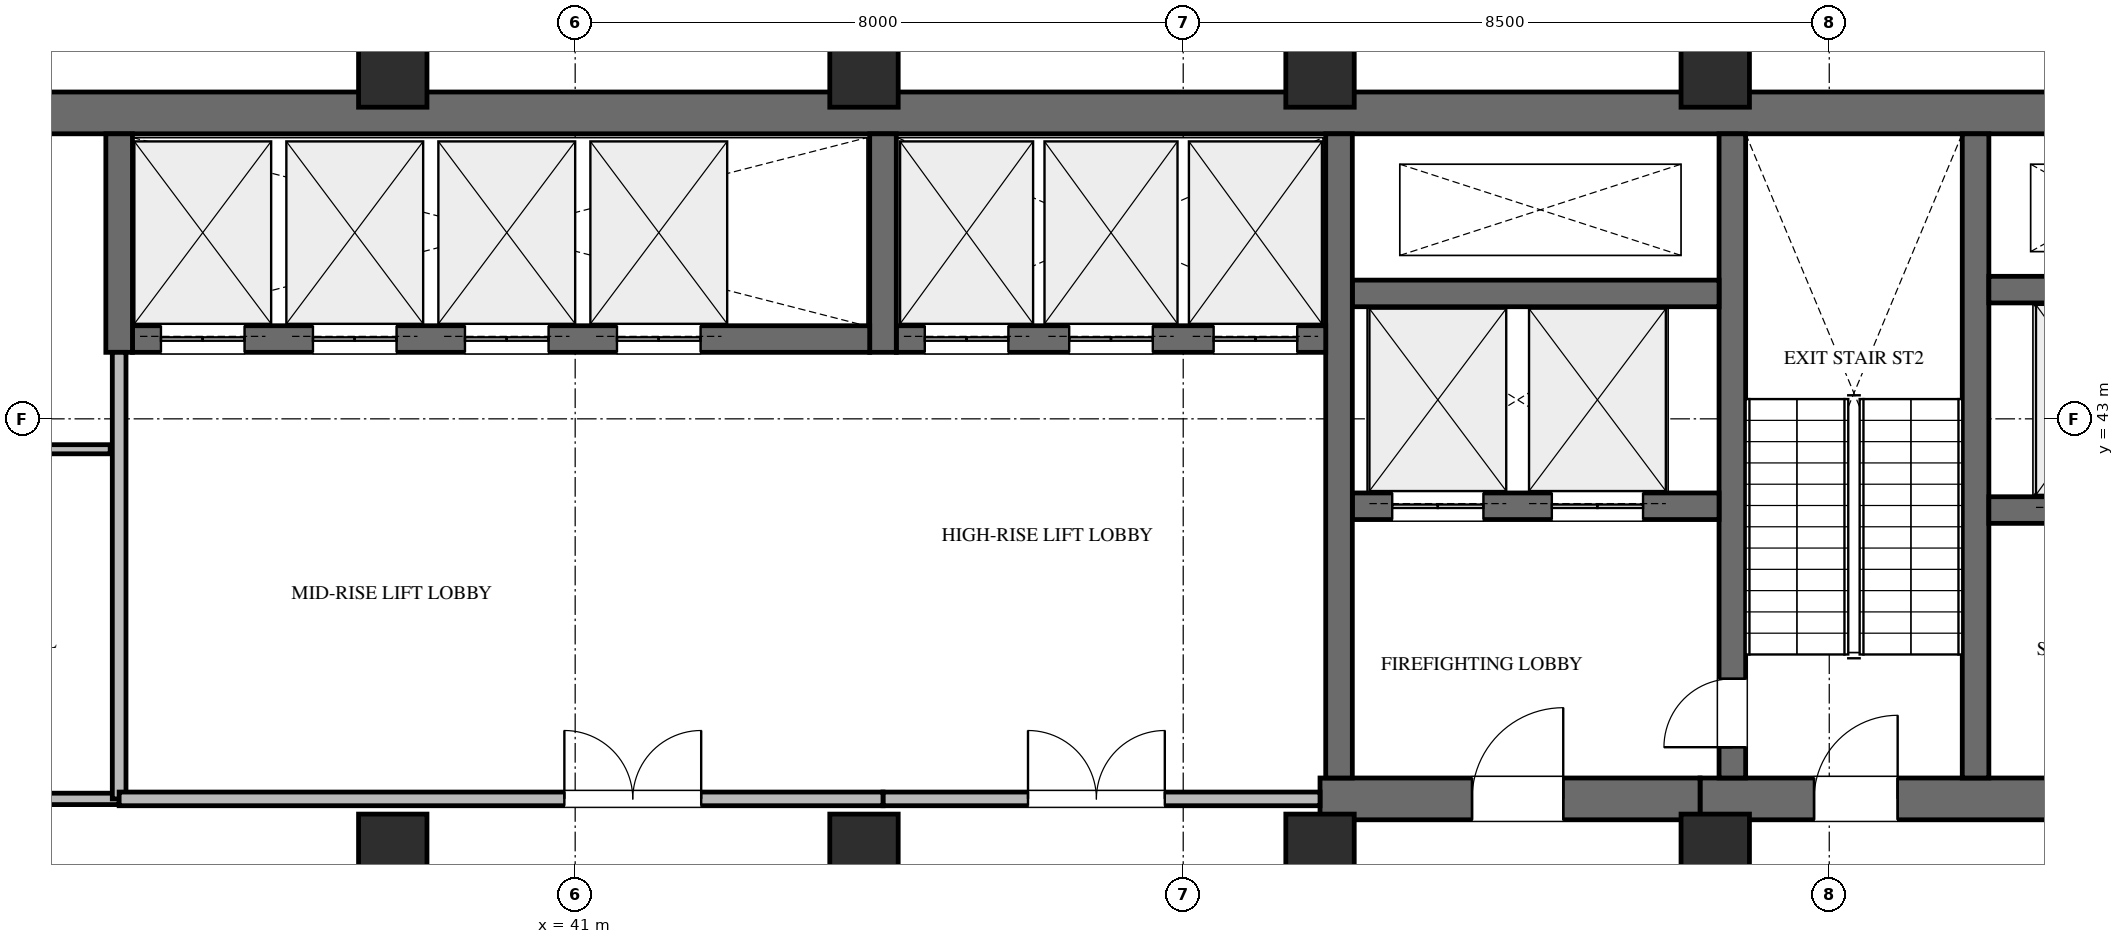
"""IFC4 building model, lengths in metres.
Left out: names, types, materials, properties, quantities, classifications, styles, units other than length and angle.
Written with IfcOpenShell. Run it as: python <this file> out.ifc"""

import sys

from ifc_helpers import new_model, si_unit, direction, frame, frame_2d, origin, origin_2d, place, context, subcontext, project, spatial, rectangle, extrude, element, fill, save


model = new_model("IFC4")
c1 = context("Model", 3, precision=1e-05, world=origin(), true_north=direction((0.0, 1.0)))
c2 = subcontext(c1, "Body", "Model", "MODEL_VIEW")
j1 = project(units=[si_unit("LENGTHUNIT", "METRE"), si_unit("PLANEANGLEUNIT", "RADIAN")], contexts=[c1])
p1 = place(None, origin())
s1 = spatial("IfcSite", under=j1, at=p1, CompositionType="ELEMENT")
p2 = place(p1, origin())
s2 = spatial("IfcBuilding", under=s1, at=p2, CompositionType="ELEMENT")
p3 = place(p2, frame((0.0, 0.0, 220.5)))
s3 = spatial("IfcBuildingStorey", under=s2, at=p3, CompositionType="ELEMENT", Elevation=220.5)
p4 = place(p3, frame((22.9, 47.025, 0.0), z_axis=(0.0, 0.0, 1.0), x_axis=(1.0, 0.0, 0.0)))
e1 = element("IfcWall", 1, at=p4, inside=s3, PredefinedType="SHEAR", context=c2, shape_type="SweptSolid", body=[
    extrude(rectangle(XDim=43.5, YDim=0.55, at=frame_2d((21.75, 0.0))), origin(), (0.0, 0.0, 1.0), 4.5),
])
p5 = place(p3, frame((55.8, 38.0, 0.0), z_axis=(0.0, 0.0, 1.0), x_axis=(1.0, 0.0, 0.0)))
e2 = element("IfcWall", 2, at=p5, inside=s3, PredefinedType="SHEAR", context=c2, shape_type="SweptSolid", body=[
    extrude(rectangle(XDim=10.6, YDim=0.55, at=frame_2d((5.3, 0.0))), origin(), (0.0, 0.0, 1.0), 4.5),
])
p6 = place(p5, frame((1.5, 0.0, 0.0)))
e3 = element("IfcOpeningElement", 3, at=p6, cuts=e2, PredefinedType="OPENING", context=c2, shape_type="SweptSolid", body=[
    extrude(rectangle(XDim=1.1, YDim=2.2, at=frame_2d((0.55, 1.1))), frame((0.0, 0.285, 0.0), z_axis=(0.0, -1.0, 0.0), x_axis=(1.0, 0.0, 0.0)), (0.0, 0.0, 1.0), 0.57),
])
p7 = place(p5, frame((4.82, 0.0, 0.0)))
e4 = element("IfcOpeningElement", 4, at=p7, cuts=e2, PredefinedType="OPENING", context=c2, shape_type="SweptSolid", body=[
    extrude(rectangle(XDim=1.0, YDim=2.15, at=frame_2d((0.5, 1.075))), frame((0.0, 0.285, 0.0), z_axis=(0.0, -1.0, 0.0), x_axis=(1.0, 0.0, 0.0)), (0.0, 0.0, 1.0), 0.57),
])
p8 = place(p5, frame((8.05, 0.0, 0.0)))
e5 = element("IfcOpeningElement", 5, at=p8, cuts=e2, PredefinedType="OPENING", context=c2, shape_type="SweptSolid", body=[
    extrude(rectangle(XDim=1.1, YDim=2.2, at=frame_2d((0.55, 1.1))), frame((0.0, 0.285, 0.0), z_axis=(0.0, -1.0, 0.0), x_axis=(1.0, 0.0, 0.0)), (0.0, 0.0, 1.0), 0.57),
])
p9 = place(p3, frame((59.425, 38.275, 0.0), z_axis=(0.0, 0.0, 1.0), x_axis=(0.0, 1.0, 0.0)))
e6 = element("IfcWall", 6, at=p9, inside=s3, PredefinedType="SHEAR", context=c2, shape_type="SweptSolid", body=[
    extrude(rectangle(XDim=8.475, YDim=0.35, at=frame_2d((4.238, 0.0))), origin(), (0.0, 0.0, 1.0), 4.5),
])
p10 = place(p3, frame((56.225, 38.275, 0.0), z_axis=(0.0, 0.0, 1.0), x_axis=(0.0, 1.0, 0.0)))
e7 = element("IfcWall", 7, at=p10, inside=s3, PredefinedType="SHEAR", context=c2, shape_type="SweptSolid", body=[
    extrude(rectangle(XDim=8.475, YDim=0.35, at=frame_2d((4.238, 0.0))), origin(), (0.0, 0.0, 1.0), 4.5),
])
p11 = place(p10, frame((0.405, 0.0, 0.0)))
e8 = element("IfcOpeningElement", 8, at=p11, cuts=e7, PredefinedType="OPENING", context=c2, shape_type="SweptSolid", body=[
    extrude(rectangle(XDim=0.9, YDim=2.15, at=frame_2d((0.45, 1.075))), frame((0.0, 0.185, 0.0), z_axis=(0.0, -1.0, 0.0), x_axis=(1.0, 0.0, 0.0)), (0.0, 0.0, 1.0), 0.37),
])
p12 = place(p3, frame((59.6, 41.8, 0.0), z_axis=(0.0, 0.0, 1.0), x_axis=(1.0, 0.0, 0.0)))
e9 = element("IfcWall", 9, at=p12, inside=s3, PredefinedType="SHEAR", context=c2, shape_type="SweptSolid", body=[
    extrude(rectangle(XDim=3.05, YDim=0.35, at=frame_2d((1.525, 0.0))), origin(), (0.0, 0.0, 1.0), 4.5),
])
p13 = place(p12, frame((0.92, 0.0, 0.0)))
e10 = element("IfcOpeningElement", 10, at=p13, cuts=e9, PredefinedType="OPENING", context=c2, shape_type="SweptSolid", body=[
    extrude(rectangle(XDim=1.2, YDim=2.2, at=frame_2d((0.6, 1.1))), frame((0.0, 0.185, 0.0), z_axis=(0.0, -1.0, 0.0), x_axis=(1.0, 0.0, 0.0)), (0.0, 0.0, 1.0), 0.37),
])
p14 = place(p3, frame((59.6, 44.7, 0.0), z_axis=(0.0, 0.0, 1.0), x_axis=(1.0, 0.0, 0.0)))
e11 = element("IfcWall", 11, at=p14, inside=s3, PredefinedType="SHEAR", context=c2, shape_type="SweptSolid", body=[
    extrude(rectangle(XDim=3.05, YDim=0.35, at=frame_2d((1.525, 0.0))), origin(), (0.0, 0.0, 1.0), 4.5),
])
p15 = place(p3, frame((50.8, 38.0, 0.0), z_axis=(0.0, 0.0, 1.0), x_axis=(1.0, 0.0, 0.0)))
e12 = element("IfcWall", 12, at=p15, inside=s3, PredefinedType="SHEAR", context=c2, shape_type="SweptSolid", body=[
    extrude(rectangle(XDim=5.0, YDim=0.55, at=frame_2d((2.5, 0.0))), origin(), (0.0, 0.0, 1.0), 4.5),
])
p16 = place(p15, frame((2.0, 0.0, 0.0)))
e13 = element("IfcOpeningElement", 13, at=p16, cuts=e12, PredefinedType="OPENING", context=c2, shape_type="SweptSolid", body=[
    extrude(rectangle(XDim=1.2, YDim=2.2, at=frame_2d((0.6, 1.1))), frame((0.0, 0.285, 0.0), z_axis=(0.0, -1.0, 0.0), x_axis=(1.0, 0.0, 0.0)), (0.0, 0.0, 1.0), 0.57),
])
p17 = place(p3, frame((51.225, 41.85, 0.0), z_axis=(0.0, 0.0, 1.0), x_axis=(1.0, 0.0, 0.0)))
e14 = element("IfcWall", 14, at=p17, inside=s3, PredefinedType="SHEAR", context=c2, shape_type="SweptSolid", body=[
    extrude(rectangle(XDim=4.825, YDim=0.35, at=frame_2d((2.413, 0.0))), origin(), (0.0, 0.0, 1.0), 4.5),
])
p18 = place(p17, frame((0.525, 0.0, 0.0)))
e15 = element("IfcOpeningElement", 15, at=p18, cuts=e14, PredefinedType="OPENING", context=c2, shape_type="SweptSolid", body=[
    extrude(rectangle(XDim=1.2, YDim=2.2, at=frame_2d((0.6, 1.1))), frame((0.0, 0.185, 0.0), z_axis=(0.0, -1.0, 0.0), x_axis=(1.0, 0.0, 0.0)), (0.0, 0.0, 1.0), 0.37),
])
p19 = place(p17, frame((2.625, 0.0, 0.0)))
e16 = element("IfcOpeningElement", 16, at=p19, cuts=e14, PredefinedType="OPENING", context=c2, shape_type="SweptSolid", body=[
    extrude(rectangle(XDim=1.2, YDim=2.2, at=frame_2d((0.6, 1.1))), frame((0.0, 0.185, 0.0), z_axis=(0.0, -1.0, 0.0), x_axis=(1.0, 0.0, 0.0)), (0.0, 0.0, 1.0), 0.37),
])
p20 = place(p3, frame((51.225, 44.65, 0.0), z_axis=(0.0, 0.0, 1.0), x_axis=(1.0, 0.0, 0.0)))
e17 = element("IfcWall", 17, at=p20, inside=s3, PredefinedType="SHEAR", context=c2, shape_type="SweptSolid", body=[
    extrude(rectangle(XDim=4.825, YDim=0.35, at=frame_2d((2.413, 0.0))), origin(), (0.0, 0.0, 1.0), 4.5),
])
p21 = place(p3, frame((51.05, 38.275, 0.0), z_axis=(0.0, 0.0, 1.0), x_axis=(0.0, 1.0, 0.0)))
e18 = element("IfcWall", 18, at=p21, inside=s3, PredefinedType="SHEAR", context=c2, shape_type="SweptSolid", body=[
    extrude(rectangle(XDim=8.475, YDim=0.35, at=frame_2d((4.238, 0.0))), origin(), (0.0, 0.0, 1.0), 4.5),
])
p22 = place(p3, frame((45.225, 44.05, 0.0), z_axis=(0.0, 0.0, 1.0), x_axis=(1.0, 0.0, 0.0)))
e19 = element("IfcWall", 19, at=p22, inside=s3, PredefinedType="SHEAR", context=c2, shape_type="SweptSolid", body=[
    extrude(rectangle(XDim=5.65, YDim=0.35, at=frame_2d((2.825, 0.0))), origin(), (0.0, 0.0, 1.0), 4.5),
])
p23 = place(p22, frame((0.375, 0.0, 0.0)))
e20 = element("IfcOpeningElement", 20, at=p23, cuts=e19, PredefinedType="OPENING", context=c2, shape_type="SweptSolid", body=[
    extrude(rectangle(XDim=1.1, YDim=2.2, at=frame_2d((0.55, 1.1))), frame((0.0, 0.185, 0.0), z_axis=(0.0, -1.0, 0.0), x_axis=(1.0, 0.0, 0.0)), (0.0, 0.0, 1.0), 0.37),
])
p24 = place(p22, frame((2.275, 0.0, 0.0)))
e21 = element("IfcOpeningElement", 21, at=p24, cuts=e19, PredefinedType="OPENING", context=c2, shape_type="SweptSolid", body=[
    extrude(rectangle(XDim=1.1, YDim=2.2, at=frame_2d((0.55, 1.1))), frame((0.0, 0.185, 0.0), z_axis=(0.0, -1.0, 0.0), x_axis=(1.0, 0.0, 0.0)), (0.0, 0.0, 1.0), 0.37),
])
p25 = place(p22, frame((4.175, 0.0, 0.0)))
e22 = element("IfcOpeningElement", 22, at=p25, cuts=e19, PredefinedType="OPENING", context=c2, shape_type="SweptSolid", body=[
    extrude(rectangle(XDim=1.1, YDim=2.2, at=frame_2d((0.55, 1.1))), frame((0.0, 0.185, 0.0), z_axis=(0.0, -1.0, 0.0), x_axis=(1.0, 0.0, 0.0)), (0.0, 0.0, 1.0), 0.37),
])
p26 = place(p3, frame((45.05, 43.875, 0.0), z_axis=(0.0, 0.0, 1.0), x_axis=(0.0, 1.0, 0.0)))
e23 = element("IfcWall", 23, at=p26, inside=s3, PredefinedType="SHEAR", context=c2, shape_type="SweptSolid", body=[
    extrude(rectangle(XDim=2.875, YDim=0.35, at=frame_2d((1.438, 0.0))), origin(), (0.0, 0.0, 1.0), 4.5),
])
p27 = place(p3, frame((35.175, 44.05, 0.0), z_axis=(0.0, 0.0, 1.0), x_axis=(1.0, 0.0, 0.0)))
e24 = element("IfcWall", 24, at=p27, inside=s3, PredefinedType="SHEAR", context=c2, shape_type="SweptSolid", body=[
    extrude(rectangle(XDim=9.7, YDim=0.35, at=frame_2d((4.85, 0.0))), origin(), (0.0, 0.0, 1.0), 4.5),
])
p28 = place(p27, frame((0.375, 0.0, 0.0)))
e25 = element("IfcOpeningElement", 25, at=p28, cuts=e24, PredefinedType="OPENING", context=c2, shape_type="SweptSolid", body=[
    extrude(rectangle(XDim=1.1, YDim=2.2, at=frame_2d((0.55, 1.1))), frame((0.0, 0.185, 0.0), z_axis=(0.0, -1.0, 0.0), x_axis=(1.0, 0.0, 0.0)), (0.0, 0.0, 1.0), 0.37),
])
p29 = place(p27, frame((2.375, 0.0, 0.0)))
e26 = element("IfcOpeningElement", 26, at=p29, cuts=e24, PredefinedType="OPENING", context=c2, shape_type="SweptSolid", body=[
    extrude(rectangle(XDim=1.1, YDim=2.2, at=frame_2d((0.55, 1.1))), frame((0.0, 0.185, 0.0), z_axis=(0.0, -1.0, 0.0), x_axis=(1.0, 0.0, 0.0)), (0.0, 0.0, 1.0), 0.37),
])
p30 = place(p27, frame((4.375, 0.0, 0.0)))
e27 = element("IfcOpeningElement", 27, at=p30, cuts=e24, PredefinedType="OPENING", context=c2, shape_type="SweptSolid", body=[
    extrude(rectangle(XDim=1.1, YDim=2.2, at=frame_2d((0.55, 1.1))), frame((0.0, 0.185, 0.0), z_axis=(0.0, -1.0, 0.0), x_axis=(1.0, 0.0, 0.0)), (0.0, 0.0, 1.0), 0.37),
])
p31 = place(p27, frame((6.375, 0.0, 0.0)))
e28 = element("IfcOpeningElement", 28, at=p31, cuts=e24, PredefinedType="OPENING", context=c2, shape_type="SweptSolid", body=[
    extrude(rectangle(XDim=1.1, YDim=2.2, at=frame_2d((0.55, 1.1))), frame((0.0, 0.185, 0.0), z_axis=(0.0, -1.0, 0.0), x_axis=(1.0, 0.0, 0.0)), (0.0, 0.0, 1.0), 0.37),
])
p32 = place(p3, frame((35.0, 43.875, 0.0), z_axis=(0.0, 0.0, 1.0), x_axis=(0.0, 1.0, 0.0)))
e29 = element("IfcWall", 29, at=p32, inside=s3, PredefinedType="SHEAR", context=c2, shape_type="SweptSolid", body=[
    extrude(rectangle(XDim=2.875, YDim=0.35, at=frame_2d((1.438, 0.0))), origin(), (0.0, 0.0, 1.0), 4.5),
])
for number, where, z_axis, x_axis in (
    (30, (56.0, 47.55, 0.0), (0.0, 0.0, 1.0), (1.0, 0.0, 0.0)),
    (31, (56.0, 37.35, 0.0), (0.0, 0.0, 1.0), (1.0, 0.0, 0.0)),
    (32, (50.8, 47.55, 0.0), (0.0, 0.0, 1.0), (1.0, 0.0, 0.0)),
    (33, (50.8, 37.35, 0.0), (0.0, 0.0, 1.0), (1.0, 0.0, 0.0)),
    (34, (44.8, 37.35, 0.0), (0.0, 0.0, 1.0), (1.0, 0.0, 0.0)),
    (35, (44.8, 47.55, 0.0), (0.0, 0.0, 1.0), (1.0, 0.0, 0.0)),
    (36, (38.6, 37.35, 0.0), (0.0, 0.0, 1.0), (1.0, 0.0, 0.0)),
    (37, (38.6, 47.55, 0.0), (0.0, 0.0, 1.0), (1.0, 0.0, 0.0)),
):
    element("IfcColumn", number, at=place(p3, frame(where, z_axis=z_axis, x_axis=x_axis)), inside=s3, PredefinedType="COLUMN", context=c2, shape_type="SweptSolid", body=[
        extrude(rectangle(XDim=0.9, YDim=0.9, at=origin_2d()), origin(), (0.0, 0.0, 1.0), 4.5),
    ])
p33 = place(p3, frame((45.05, 38.0, 0.0), z_axis=(0.0, 0.0, 1.0), x_axis=(1.0, 0.0, 0.0)))
e38 = element("IfcWall", 38, at=p33, inside=s3, PredefinedType="STANDARD", context=c2, shape_type="SweptSolid", body=[
    extrude(rectangle(XDim=5.75, YDim=0.18, at=frame_2d((2.875, 0.0))), origin(), (0.0, 0.0, 1.0), 3.447),
])
p34 = place(p33, frame((1.908, 0.0, 0.0)))
e39 = element("IfcOpeningElement", 39, at=p34, cuts=e38, PredefinedType="OPENING", context=c2, shape_type="SweptSolid", body=[
    extrude(rectangle(XDim=1.8, YDim=2.2, at=frame_2d((0.9, 1.1))), frame((0.0, 0.1, 0.0), z_axis=(0.0, -1.0, 0.0), x_axis=(1.0, 0.0, 0.0)), (0.0, 0.0, 1.0), 0.2),
])
p35 = place(p3, frame((27.05, 38.0, 0.0), z_axis=(0.0, 0.0, 1.0), x_axis=(1.0, 0.0, 0.0)))
e40 = element("IfcWall", 40, at=p35, inside=s3, PredefinedType="PARTITIONING", context=c2, shape_type="SweptSolid", body=[
    extrude(rectangle(XDim=7.95, YDim=0.15, at=frame_2d((3.975, 0.0))), origin(), (0.0, 0.0, 1.0), 3.447),
])
p36 = place(p35, frame((1.985, 0.0, 0.0)))
e41 = element("IfcOpeningElement", 41, at=p36, cuts=e40, PredefinedType="OPENING", context=c2, shape_type="SweptSolid", body=[
    extrude(rectangle(XDim=1.05, YDim=2.2, at=frame_2d((0.525, 1.1))), frame((0.0, 0.085, 0.0), z_axis=(0.0, -1.0, 0.0), x_axis=(1.0, 0.0, 0.0)), (0.0, 0.0, 1.0), 0.17),
])
p37 = place(p3, frame((35.0, 38.0, 0.0), z_axis=(0.0, 0.0, 1.0), x_axis=(0.0, 1.0, 0.0)))
e42 = element("IfcWall", 42, at=p37, inside=s3, PredefinedType="STANDARD", context=c2, shape_type="SweptSolid", body=[
    extrude(rectangle(XDim=5.875, YDim=0.18, at=frame_2d((2.938, 0.0))), origin(), (0.0, 0.0, 1.0), 4.22),
])
p38 = place(p3, frame((30.868, 42.6, 0.0), z_axis=(0.0, 0.0, 1.0), x_axis=(1.0, 0.0, 0.0)))
e43 = element("IfcWall", 43, at=p38, inside=s3, PredefinedType="PARTITIONING", context=c2, shape_type="SweptSolid", body=[
    extrude(rectangle(XDim=4.014, YDim=0.12, at=frame_2d((2.007, 0.0))), origin(), (0.0, 0.0, 1.0), 3.447),
])
p39 = place(p38, frame((1.622, 0.0, 0.0)))
e44 = element("IfcOpeningElement", 44, at=p39, cuts=e43, PredefinedType="OPENING", context=c2, shape_type="SweptSolid", body=[
    extrude(rectangle(XDim=0.85, YDim=2.1, at=frame_2d((0.425, 1.05))), frame((0.0, 0.07, 0.0), z_axis=(0.0, -1.0, 0.0), x_axis=(1.0, 0.0, 0.0)), (0.0, 0.0, 1.0), 0.14),
])
p40 = place(p3, frame((35.0, 38.0, 0.0), z_axis=(0.0, 0.0, 1.0), x_axis=(1.0, 0.0, 0.0)))
e45 = element("IfcWall", 45, at=p40, inside=s3, PredefinedType="STANDARD", context=c2, shape_type="SweptSolid", body=[
    extrude(rectangle(XDim=10.05, YDim=0.18, at=frame_2d((5.025, 0.0))), origin(), (0.0, 0.0, 1.0), 3.447),
])
p41 = place(p40, frame((5.858, 0.0, 0.0)))
e46 = element("IfcOpeningElement", 46, at=p41, cuts=e45, PredefinedType="OPENING", context=c2, shape_type="SweptSolid", body=[
    extrude(rectangle(XDim=1.8, YDim=2.2, at=frame_2d((0.9, 1.1))), frame((0.0, 0.1, 0.0), z_axis=(0.0, -1.0, 0.0), x_axis=(1.0, 0.0, 0.0)), (0.0, 0.0, 1.0), 0.2),
])
p42 = place(p6, origin())
e47 = element("IfcDoor", 47, at=p42, inside=s3, OperationType="SINGLE_SWING_RIGHT", PredefinedType="DOOR", context=c2, shape_type="SweptSolid", body=[
    extrude(rectangle(XDim=1.1, YDim=2.2, at=frame_2d((0.55, 1.1))), frame((0.0, 0.025, 0.0), z_axis=(0.0, -1.0, 0.0), x_axis=(1.0, 0.0, 0.0)), (0.0, 0.0, 1.0), 0.05),
])
fill(e3, e47)
p43 = place(p16, origin())
e48 = element("IfcDoor", 48, at=p43, inside=s3, OperationType="SINGLE_SWING_RIGHT", PredefinedType="DOOR", context=c2, shape_type="SweptSolid", body=[
    extrude(rectangle(XDim=1.2, YDim=2.2, at=frame_2d((0.6, 1.1))), frame((0.0, 0.025, 0.0), z_axis=(0.0, -1.0, 0.0), x_axis=(1.0, 0.0, 0.0)), (0.0, 0.0, 1.0), 0.05),
])
fill(e13, e48)
p44 = place(p11, origin())
e49 = element("IfcDoor", 49, at=p44, inside=s3, OperationType="SINGLE_SWING_LEFT", PredefinedType="DOOR", context=c2, shape_type="SweptSolid", body=[
    extrude(rectangle(XDim=0.9, YDim=2.15, at=frame_2d((0.45, 1.075))), frame((0.0, 0.025, 0.0), z_axis=(0.0, -1.0, 0.0), x_axis=(1.0, 0.0, 0.0)), (0.0, 0.0, 1.0), 0.05),
])
fill(e8, e49)
p45 = place(p28, origin())
e50 = element("IfcDoor", 50, at=p45, inside=s3, OperationType="DOUBLE_DOOR_SLIDING", PredefinedType="DOOR", context=c2, shape_type="SweptSolid", body=[
    extrude(rectangle(XDim=1.1, YDim=2.2, at=frame_2d((0.55, 1.1))), frame((0.0, 0.025, 0.0), z_axis=(0.0, -1.0, 0.0), x_axis=(1.0, 0.0, 0.0)), (0.0, 0.0, 1.0), 0.05),
])
fill(e25, e50)
p46 = place(p29, origin())
e51 = element("IfcDoor", 51, at=p46, inside=s3, OperationType="DOUBLE_DOOR_SLIDING", PredefinedType="DOOR", context=c2, shape_type="SweptSolid", body=[
    extrude(rectangle(XDim=1.1, YDim=2.2, at=frame_2d((0.55, 1.1))), frame((0.0, 0.025, 0.0), z_axis=(0.0, -1.0, 0.0), x_axis=(1.0, 0.0, 0.0)), (0.0, 0.0, 1.0), 0.05),
])
fill(e26, e51)
p47 = place(p30, origin())
e52 = element("IfcDoor", 52, at=p47, inside=s3, OperationType="DOUBLE_DOOR_SLIDING", PredefinedType="DOOR", context=c2, shape_type="SweptSolid", body=[
    extrude(rectangle(XDim=1.1, YDim=2.2, at=frame_2d((0.55, 1.1))), frame((0.0, 0.025, 0.0), z_axis=(0.0, -1.0, 0.0), x_axis=(1.0, 0.0, 0.0)), (0.0, 0.0, 1.0), 0.05),
])
fill(e27, e52)
p48 = place(p31, origin())
e53 = element("IfcDoor", 53, at=p48, inside=s3, OperationType="DOUBLE_DOOR_SLIDING", PredefinedType="DOOR", context=c2, shape_type="SweptSolid", body=[
    extrude(rectangle(XDim=1.1, YDim=2.2, at=frame_2d((0.55, 1.1))), frame((0.0, 0.025, 0.0), z_axis=(0.0, -1.0, 0.0), x_axis=(1.0, 0.0, 0.0)), (0.0, 0.0, 1.0), 0.05),
])
fill(e28, e53)
p49 = place(p23, origin())
e54 = element("IfcDoor", 54, at=p49, inside=s3, OperationType="DOUBLE_DOOR_SLIDING", PredefinedType="DOOR", context=c2, shape_type="SweptSolid", body=[
    extrude(rectangle(XDim=1.1, YDim=2.2, at=frame_2d((0.55, 1.1))), frame((0.0, 0.025, 0.0), z_axis=(0.0, -1.0, 0.0), x_axis=(1.0, 0.0, 0.0)), (0.0, 0.0, 1.0), 0.05),
])
fill(e20, e54)
p50 = place(p24, origin())
e55 = element("IfcDoor", 55, at=p50, inside=s3, OperationType="DOUBLE_DOOR_SLIDING", PredefinedType="DOOR", context=c2, shape_type="SweptSolid", body=[
    extrude(rectangle(XDim=1.1, YDim=2.2, at=frame_2d((0.55, 1.1))), frame((0.0, 0.025, 0.0), z_axis=(0.0, -1.0, 0.0), x_axis=(1.0, 0.0, 0.0)), (0.0, 0.0, 1.0), 0.05),
])
fill(e21, e55)
p51 = place(p25, origin())
e56 = element("IfcDoor", 56, at=p51, inside=s3, OperationType="DOUBLE_DOOR_SLIDING", PredefinedType="DOOR", context=c2, shape_type="SweptSolid", body=[
    extrude(rectangle(XDim=1.1, YDim=2.2, at=frame_2d((0.55, 1.1))), frame((0.0, 0.025, 0.0), z_axis=(0.0, -1.0, 0.0), x_axis=(1.0, 0.0, 0.0)), (0.0, 0.0, 1.0), 0.05),
])
fill(e22, e56)
p52 = place(p18, origin())
e57 = element("IfcDoor", 57, at=p52, inside=s3, OperationType="DOUBLE_DOOR_SLIDING", PredefinedType="DOOR", context=c2, shape_type="SweptSolid", body=[
    extrude(rectangle(XDim=1.2, YDim=2.2, at=frame_2d((0.6, 1.1))), frame((0.0, 0.025, 0.0), z_axis=(0.0, -1.0, 0.0), x_axis=(1.0, 0.0, 0.0)), (0.0, 0.0, 1.0), 0.05),
])
fill(e15, e57)
p53 = place(p19, origin())
e58 = element("IfcDoor", 58, at=p53, inside=s3, OperationType="DOUBLE_DOOR_SLIDING", PredefinedType="DOOR", context=c2, shape_type="SweptSolid", body=[
    extrude(rectangle(XDim=1.2, YDim=2.2, at=frame_2d((0.6, 1.1))), frame((0.0, 0.025, 0.0), z_axis=(0.0, -1.0, 0.0), x_axis=(1.0, 0.0, 0.0)), (0.0, 0.0, 1.0), 0.05),
])
fill(e16, e58)
p54 = place(p34, origin())
e59 = element("IfcDoor", 59, at=p54, inside=s3, OperationType="DOUBLE_DOOR_SINGLE_SWING", PredefinedType="DOOR", context=c2, shape_type="SweptSolid", body=[
    extrude(rectangle(XDim=1.8, YDim=2.2, at=frame_2d((0.9, 1.1))), frame((0.0, 0.025, 0.0), z_axis=(0.0, -1.0, 0.0), x_axis=(1.0, 0.0, 0.0)), (0.0, 0.0, 1.0), 0.05),
])
fill(e39, e59)
p55 = place(p41, origin())
e60 = element("IfcDoor", 60, at=p55, inside=s3, OperationType="DOUBLE_DOOR_SINGLE_SWING", PredefinedType="DOOR", context=c2, shape_type="SweptSolid", body=[
    extrude(rectangle(XDim=1.8, YDim=2.2, at=frame_2d((0.9, 1.1))), frame((0.0, 0.025, 0.0), z_axis=(0.0, -1.0, 0.0), x_axis=(1.0, 0.0, 0.0)), (0.0, 0.0, 1.0), 0.05),
])
fill(e46, e60)
save(model, sys.argv[1])
